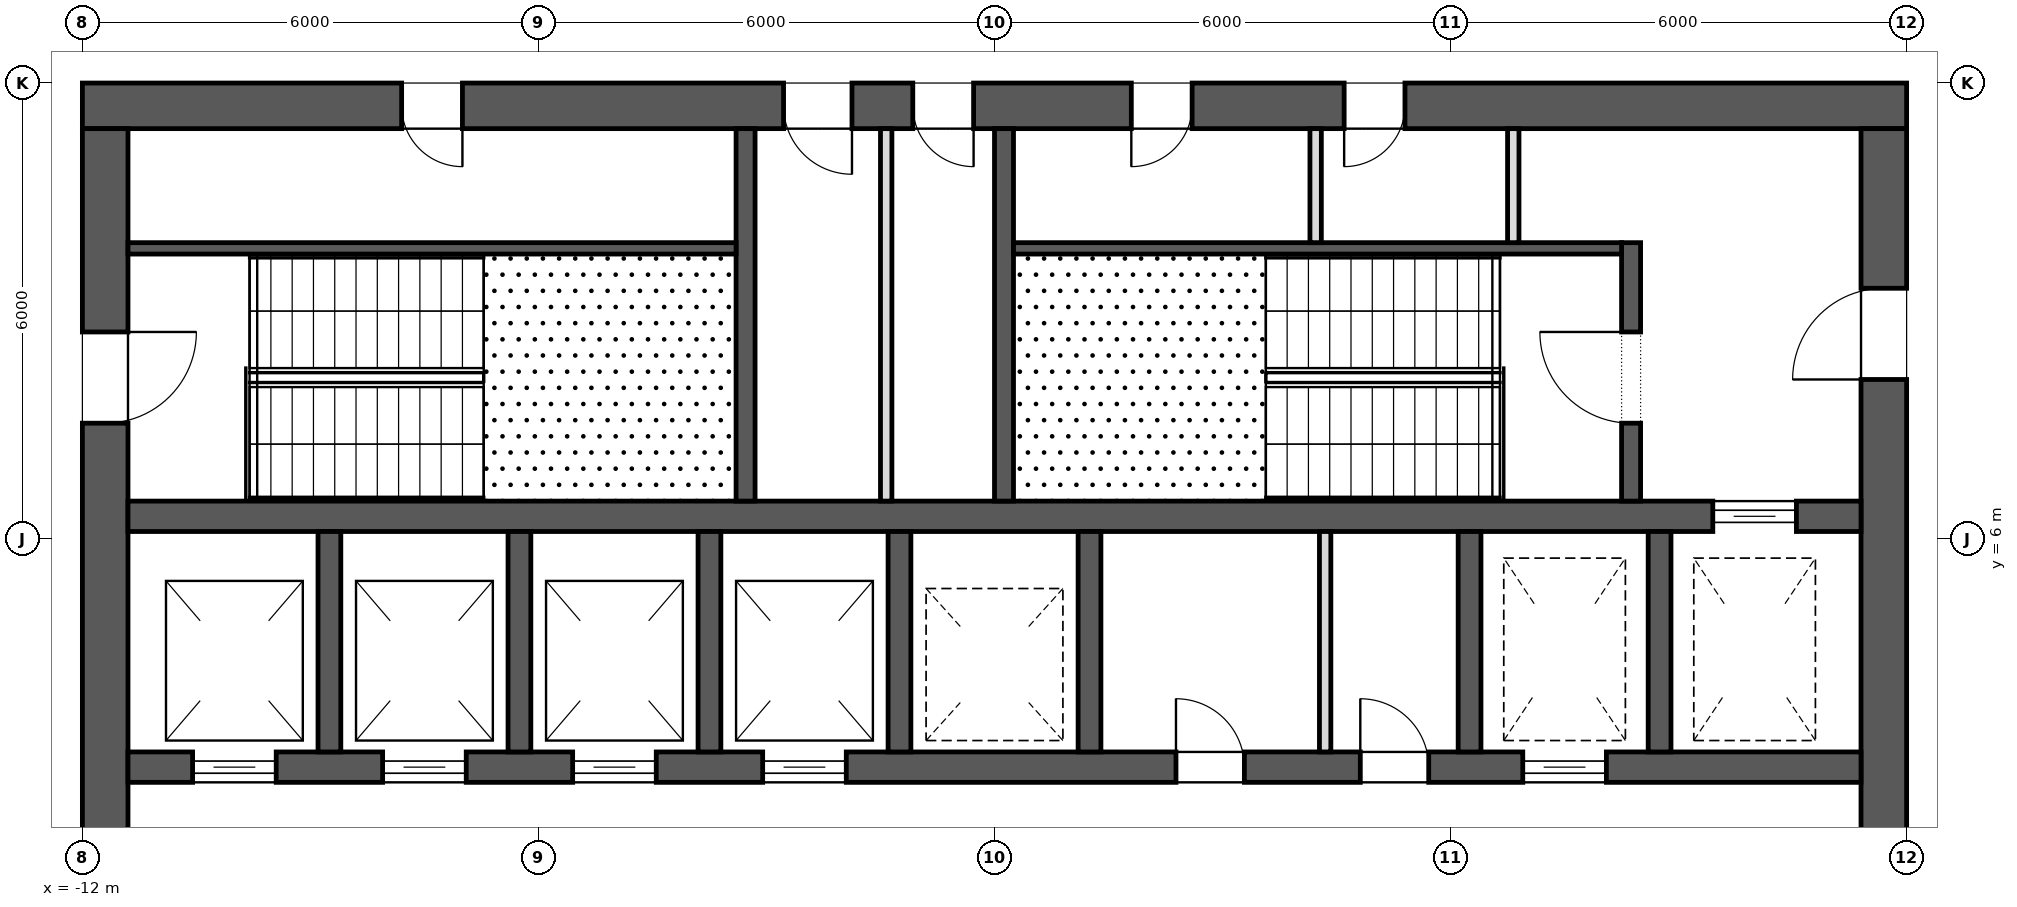
"""IFC4 building model, lengths in metres.
Left out: names, types, materials, properties, quantities, classifications, styles, units other than length and angle.
Written with IfcOpenShell. Run it as: python <this file> out.ifc"""

import sys

from ifc_helpers import new_model, si_unit, direction, frame, frame_2d, origin, place, context, subcontext, project, spatial, rectangle, extrude, element, fill, save


model = new_model("IFC4")
c1 = context("Model", 3, precision=1e-05, world=origin(), true_north=direction((0.0, 1.0)))
c2 = subcontext(c1, "Body", "Model", "MODEL_VIEW")
j1 = project(units=[si_unit("LENGTHUNIT", "METRE"), si_unit("PLANEANGLEUNIT", "RADIAN")], contexts=[c1])
p1 = place(None, origin())
s1 = spatial("IfcSite", under=j1, at=p1, CompositionType="ELEMENT")
p2 = place(p1, origin())
s2 = spatial("IfcBuilding", under=s1, at=p2, CompositionType="ELEMENT")
p3 = place(p2, frame((0.0, 0.0, 234.9)))
s3 = spatial("IfcBuildingStorey", under=s2, at=p3, CompositionType="ELEMENT", Elevation=234.9)
p4 = place(p3, frame((-12.0, 11.7, 0.0), z_axis=(0.0, 0.0, 1.0), x_axis=(1.0, 0.0, 0.0)))
e1 = element("IfcWall", 1, at=p4, inside=s3, PredefinedType="SHEAR", context=c2, shape_type="SweptSolid", body=[
    extrude(rectangle(XDim=24.0, YDim=0.6, at=frame_2d((12.0, 0.0))), origin(), (0.0, 0.0, 1.0), 4.0),
])
p5 = place(p4, frame((9.225, 0.0, 0.0)))
e2 = element("IfcOpeningElement", 2, at=p5, cuts=e1, PredefinedType="OPENING", context=c2, shape_type="SweptSolid", body=[
    extrude(rectangle(XDim=0.9, YDim=2.1, at=frame_2d((0.45, 1.05))), frame((0.0, 0.312, 0.0), z_axis=(0.0, -1.0, 0.0), x_axis=(1.0, 0.0, 0.0)), (0.0, 0.0, 1.0), 0.624),
])
p6 = place(p4, frame((10.925, 0.0, 0.0)))
e3 = element("IfcOpeningElement", 3, at=p6, cuts=e1, PredefinedType="OPENING", context=c2, shape_type="SweptSolid", body=[
    extrude(rectangle(XDim=0.8, YDim=2.1, at=frame_2d((0.4, 1.05))), frame((0.0, 0.312, 0.0), z_axis=(0.0, -1.0, 0.0), x_axis=(1.0, 0.0, 0.0)), (0.0, 0.0, 1.0), 0.624),
])
p7 = place(p4, frame((4.2, 0.0, 0.0)))
e4 = element("IfcOpeningElement", 4, at=p7, cuts=e1, PredefinedType="OPENING", context=c2, shape_type="SweptSolid", body=[
    extrude(rectangle(XDim=0.8, YDim=2.1, at=frame_2d((0.4, 1.05))), frame((0.0, 0.312, 0.0), z_axis=(0.0, -1.0, 0.0), x_axis=(1.0, 0.0, 0.0)), (0.0, 0.0, 1.0), 0.624),
])
p8 = place(p4, frame((13.8, 0.0, 0.0)))
e5 = element("IfcOpeningElement", 5, at=p8, cuts=e1, PredefinedType="OPENING", context=c2, shape_type="SweptSolid", body=[
    extrude(rectangle(XDim=0.8, YDim=2.1, at=frame_2d((0.4, 1.05))), frame((0.0, 0.312, 0.0), z_axis=(0.0, -1.0, 0.0), x_axis=(1.0, 0.0, 0.0)), (0.0, 0.0, 1.0), 0.624),
])
p9 = place(p4, frame((16.6, 0.0, 0.0)))
e6 = element("IfcOpeningElement", 6, at=p9, cuts=e1, PredefinedType="OPENING", context=c2, shape_type="SweptSolid", body=[
    extrude(rectangle(XDim=0.8, YDim=2.1, at=frame_2d((0.4, 1.05))), frame((0.0, 0.312, 0.0), z_axis=(0.0, -1.0, 0.0), x_axis=(1.0, 0.0, 0.0)), (0.0, 0.0, 1.0), 0.624),
])
p10 = place(p3, frame((11.7, -11.4, 0.0), z_axis=(0.0, 0.0, 1.0), x_axis=(0.0, 1.0, 0.0)))
e7 = element("IfcWall", 7, at=p10, inside=s3, PredefinedType="SHEAR", context=c2, shape_type="SweptSolid", body=[
    extrude(rectangle(XDim=22.8, YDim=0.6, at=frame_2d((11.4, 0.0))), origin(), (0.0, 0.0, 1.0), 4.0),
])
p11 = place(p10, frame((10.2, 0.0, 0.0)))
e8 = element("IfcOpeningElement", 8, at=p11, cuts=e7, PredefinedType="OPENING", context=c2, shape_type="SweptSolid", body=[
    extrude(rectangle(XDim=2.4, YDim=2.1, at=frame_2d((1.2, 1.05))), frame((0.0, 0.312, 0.0), z_axis=(0.0, -1.0, 0.0), x_axis=(1.0, 0.0, 0.0)), (0.0, 0.0, 1.0), 0.624),
])
p12 = place(p10, frame((19.5, 0.0, 0.0)))
e9 = element("IfcOpeningElement", 9, at=p12, cuts=e7, PredefinedType="OPENING", context=c2, shape_type="SweptSolid", body=[
    extrude(rectangle(XDim=1.2, YDim=2.1, at=frame_2d((0.6, 1.05))), frame((0.0, 0.312, 0.0), z_axis=(0.0, -1.0, 0.0), x_axis=(1.0, 0.0, 0.0)), (0.0, 0.0, 1.0), 0.624),
])
p13 = place(p10, frame((2.1, 0.0, 0.0)))
e10 = element("IfcOpeningElement", 10, at=p13, cuts=e7, PredefinedType="OPENING", context=c2, shape_type="SweptSolid", body=[
    extrude(rectangle(XDim=1.2, YDim=2.1, at=frame_2d((0.6, 1.05))), frame((0.0, 0.312, 0.0), z_axis=(0.0, -1.0, 0.0), x_axis=(1.0, 0.0, 0.0)), (0.0, 0.0, 1.0), 0.624),
])
p14 = place(p3, frame((-11.7, -11.4, 0.0), z_axis=(0.0, 0.0, 1.0), x_axis=(0.0, 1.0, 0.0)))
e11 = element("IfcWall", 11, at=p14, inside=s3, PredefinedType="SHEAR", context=c2, shape_type="SweptSolid", body=[
    extrude(rectangle(XDim=22.8, YDim=0.6, at=frame_2d((11.4, 0.0))), origin(), (0.0, 0.0, 1.0), 4.0),
])
p15 = place(p14, frame((10.2, 0.0, 0.0)))
e12 = element("IfcOpeningElement", 12, at=p15, cuts=e11, PredefinedType="OPENING", context=c2, shape_type="SweptSolid", body=[
    extrude(rectangle(XDim=2.4, YDim=2.1, at=frame_2d((1.2, 1.05))), frame((0.0, 0.312, 0.0), z_axis=(0.0, -1.0, 0.0), x_axis=(1.0, 0.0, 0.0)), (0.0, 0.0, 1.0), 0.624),
])
p16 = place(p14, frame((18.925, 0.0, 0.0)))
e13 = element("IfcOpeningElement", 13, at=p16, cuts=e11, PredefinedType="OPENING", context=c2, shape_type="SweptSolid", body=[
    extrude(rectangle(XDim=1.2, YDim=2.1, at=frame_2d((0.6, 1.05))), frame((0.0, 0.312, 0.0), z_axis=(0.0, -1.0, 0.0), x_axis=(1.0, 0.0, 0.0)), (0.0, 0.0, 1.0), 0.624),
])
p17 = place(p14, frame((2.675, 0.0, 0.0)))
e14 = element("IfcOpeningElement", 14, at=p17, cuts=e11, PredefinedType="OPENING", context=c2, shape_type="SweptSolid", body=[
    extrude(rectangle(XDim=1.2, YDim=2.1, at=frame_2d((0.6, 1.05))), frame((0.0, 0.312, 0.0), z_axis=(0.0, -1.0, 0.0), x_axis=(1.0, 0.0, 0.0)), (0.0, 0.0, 1.0), 0.624),
])
p18 = place(p3, frame((-11.4, 3.0, 0.0), z_axis=(0.0, 0.0, 1.0), x_axis=(1.0, 0.0, 0.0)))
e15 = element("IfcWall", 15, at=p18, inside=s3, PredefinedType="SHEAR", context=c2, shape_type="SweptSolid", body=[
    extrude(rectangle(XDim=22.8, YDim=0.4, at=frame_2d((11.4, 0.0))), origin(), (0.0, 0.0, 1.0), 4.0),
])
p19 = place(p18, frame((0.85, 0.0, 0.0)))
e16 = element("IfcOpeningElement", 16, at=p19, cuts=e15, PredefinedType="OPENING", context=c2, shape_type="SweptSolid", body=[
    extrude(rectangle(XDim=1.1, YDim=2.1, at=frame_2d((0.55, 1.05))), frame((0.0, 0.212, 0.0), z_axis=(0.0, -1.0, 0.0), x_axis=(1.0, 0.0, 0.0)), (0.0, 0.0, 1.0), 0.424),
])
p20 = place(p18, frame((3.35, 0.0, 0.0)))
e17 = element("IfcOpeningElement", 17, at=p20, cuts=e15, PredefinedType="OPENING", context=c2, shape_type="SweptSolid", body=[
    extrude(rectangle(XDim=1.1, YDim=2.1, at=frame_2d((0.55, 1.05))), frame((0.0, 0.212, 0.0), z_axis=(0.0, -1.0, 0.0), x_axis=(1.0, 0.0, 0.0)), (0.0, 0.0, 1.0), 0.424),
])
p21 = place(p18, frame((5.85, 0.0, 0.0)))
e18 = element("IfcOpeningElement", 18, at=p21, cuts=e15, PredefinedType="OPENING", context=c2, shape_type="SweptSolid", body=[
    extrude(rectangle(XDim=1.1, YDim=2.1, at=frame_2d((0.55, 1.05))), frame((0.0, 0.212, 0.0), z_axis=(0.0, -1.0, 0.0), x_axis=(1.0, 0.0, 0.0)), (0.0, 0.0, 1.0), 0.424),
])
p22 = place(p18, frame((8.35, 0.0, 0.0)))
e19 = element("IfcOpeningElement", 19, at=p22, cuts=e15, PredefinedType="OPENING", context=c2, shape_type="SweptSolid", body=[
    extrude(rectangle(XDim=1.1, YDim=2.1, at=frame_2d((0.55, 1.05))), frame((0.0, 0.212, 0.0), z_axis=(0.0, -1.0, 0.0), x_axis=(1.0, 0.0, 0.0)), (0.0, 0.0, 1.0), 0.424),
])
p23 = place(p18, frame((18.35, 0.0, 0.0)))
e20 = element("IfcOpeningElement", 20, at=p23, cuts=e15, PredefinedType="OPENING", context=c2, shape_type="SweptSolid", body=[
    extrude(rectangle(XDim=1.1, YDim=2.1, at=frame_2d((0.55, 1.05))), frame((0.0, 0.212, 0.0), z_axis=(0.0, -1.0, 0.0), x_axis=(1.0, 0.0, 0.0)), (0.0, 0.0, 1.0), 0.424),
])
p24 = place(p18, frame((13.788, 0.0, 0.0)))
e21 = element("IfcOpeningElement", 21, at=p24, cuts=e15, PredefinedType="OPENING", context=c2, shape_type="SweptSolid", body=[
    extrude(rectangle(XDim=0.9, YDim=2.1, at=frame_2d((0.45, 1.05))), frame((0.0, 0.212, 0.0), z_axis=(0.0, -1.0, 0.0), x_axis=(1.0, 0.0, 0.0)), (0.0, 0.0, 1.0), 0.424),
])
p25 = place(p18, frame((16.212, 0.0, 0.0)))
e22 = element("IfcOpeningElement", 22, at=p25, cuts=e15, PredefinedType="OPENING", context=c2, shape_type="SweptSolid", body=[
    extrude(rectangle(XDim=0.9, YDim=2.1, at=frame_2d((0.45, 1.05))), frame((0.0, 0.212, 0.0), z_axis=(0.0, -1.0, 0.0), x_axis=(1.0, 0.0, 0.0)), (0.0, 0.0, 1.0), 0.424),
])
p26 = place(p3, frame((-11.4, 6.3, 0.0), z_axis=(0.0, 0.0, 1.0), x_axis=(1.0, 0.0, 0.0)))
e23 = element("IfcWall", 23, at=p26, inside=s3, PredefinedType="SHEAR", context=c2, shape_type="SweptSolid", body=[
    extrude(rectangle(XDim=22.8, YDim=0.4, at=frame_2d((11.4, 0.0))), origin(), (0.0, 0.0, 1.0), 4.0),
])
p27 = place(p26, frame((20.85, 0.0, 0.0)))
e24 = element("IfcOpeningElement", 24, at=p27, cuts=e23, PredefinedType="OPENING", context=c2, shape_type="SweptSolid", body=[
    extrude(rectangle(XDim=1.1, YDim=2.1, at=frame_2d((0.55, 1.05))), frame((0.0, 0.212, 0.0), z_axis=(0.0, -1.0, 0.0), x_axis=(1.0, 0.0, 0.0)), (0.0, 0.0, 1.0), 0.424),
])
for number, where, z_axis, x_axis in (
    (25, (-8.75, 3.2, 0.0), (0.0, 0.0, 1.0), (0.0, 1.0, 0.0)),
    (26, (-6.25, 3.2, 0.0), (0.0, 0.0, 1.0), (0.0, 1.0, 0.0)),
    (27, (-3.75, 3.2, 0.0), (0.0, 0.0, 1.0), (0.0, 1.0, 0.0)),
    (28, (-1.25, 3.2, 0.0), (0.0, 0.0, 1.0), (0.0, 1.0, 0.0)),
    (29, (1.25, 3.2, 0.0), (0.0, 0.0, 1.0), (0.0, 1.0, 0.0)),
    (30, (6.25, 3.2, 0.0), (0.0, 0.0, 1.0), (0.0, 1.0, 0.0)),
    (31, (8.75, 3.2, 0.0), (0.0, 0.0, 1.0), (0.0, 1.0, 0.0)),
):
    element("IfcWall", number, at=place(p3, frame(where, z_axis=z_axis, x_axis=x_axis)), inside=s3, PredefinedType="SHEAR", context=c2, shape_type="SweptSolid", body=[
        extrude(rectangle(XDim=2.9, YDim=0.3, at=frame_2d((1.45, 0.0))), origin(), (0.0, 0.0, 1.0), 4.0),
    ])
for number, where, z_axis, x_axis in (
    (32, (-3.275, 6.5, 0.0), (0.0, 0.0, 1.0), (0.0, 1.0, 0.0)),
    (33, (0.125, 6.5, 0.0), (0.0, 0.0, 1.0), (0.0, 1.0, 0.0)),
):
    element("IfcWall", number, at=place(p3, frame(where, z_axis=z_axis, x_axis=x_axis)), inside=s3, PredefinedType="SHEAR", context=c2, shape_type="SweptSolid", body=[
        extrude(rectangle(XDim=4.9, YDim=0.25, at=frame_2d((2.45, 0.0))), origin(), (0.0, 0.0, 1.0), 3.7),
    ])
p28 = place(p3, frame((8.375, 6.5, 0.0), z_axis=(0.0, 0.0, 1.0), x_axis=(0.0, 1.0, 0.0)))
e34 = element("IfcWall", 34, at=p28, inside=s3, PredefinedType="SHEAR", context=c2, shape_type="SweptSolid", body=[
    extrude(rectangle(XDim=3.4, YDim=0.25, at=frame_2d((1.7, 0.0))), origin(), (0.0, 0.0, 1.0), 3.7),
])
p29 = place(p28, frame((1.025, 0.0, 0.0)))
e35 = element("IfcOpeningElement", 35, at=p29, cuts=e34, PredefinedType="OPENING", context=c2, shape_type="SweptSolid", body=[
    extrude(rectangle(XDim=1.2, YDim=2.1, at=frame_2d((0.6, 1.05))), frame((0.0, 0.137, 0.0), z_axis=(0.0, -1.0, 0.0), x_axis=(1.0, 0.0, 0.0)), (0.0, 0.0, 1.0), 0.274),
])
for number, where, z_axis, x_axis in (
    (36, (-11.4, 9.825, 0.0), (0.0, 0.0, 1.0), (1.0, 0.0, 0.0)),
    (37, (0.25, 9.825, 0.0), (0.0, 0.0, 1.0), (1.0, 0.0, 0.0)),
):
    element("IfcWall", number, at=place(p3, frame(where, z_axis=z_axis, x_axis=x_axis)), inside=s3, PredefinedType="SHEAR", context=c2, shape_type="SweptSolid", body=[
        extrude(rectangle(XDim=8.0, YDim=0.15, at=frame_2d((4.0, 0.0))), origin(), (0.0, 0.0, 1.0), 3.7),
    ])
p30 = place(p3, frame((-1.425, 6.5, 0.0), z_axis=(0.0, 0.0, 1.0), x_axis=(0.0, 1.0, 0.0)))
e38 = element("IfcWall", 38, at=p30, inside=s3, PredefinedType="PARTITIONING", context=c2, shape_type="SweptSolid", body=[
    extrude(rectangle(XDim=4.9, YDim=0.15, at=frame_2d((2.45, 0.0))), origin(), (0.0, 0.0, 1.0), 3.7),
])
for number, where, z_axis, x_axis in (
    (39, (4.225, 9.9, 0.0), (0.0, 0.0, 1.0), (0.0, 1.0, 0.0)),
    (40, (6.825, 9.9, 0.0), (0.0, 0.0, 1.0), (0.0, 1.0, 0.0)),
):
    element("IfcWall", number, at=place(p3, frame(where, z_axis=z_axis, x_axis=x_axis)), inside=s3, PredefinedType="PARTITIONING", context=c2, shape_type="SweptSolid", body=[
        extrude(rectangle(XDim=1.5, YDim=0.15, at=frame_2d((0.75, 0.0))), origin(), (0.0, 0.0, 1.0), 3.7),
    ])
p31 = place(p3, frame((4.35, 3.2, 0.0), z_axis=(0.0, 0.0, 1.0), x_axis=(0.0, 1.0, 0.0)))
e41 = element("IfcWall", 41, at=p31, inside=s3, PredefinedType="PARTITIONING", context=c2, shape_type="SweptSolid", body=[
    extrude(rectangle(XDim=2.9, YDim=0.15, at=frame_2d((1.45, 0.0))), origin(), (0.0, 0.0, 1.0), 3.7),
])
p32 = place(p27, origin())
e42 = element("IfcDoor", 42, at=p32, inside=s3, OperationType="SLIDING_TO_LEFT", PredefinedType="DOOR", context=c2, shape_type="SweptSolid", body=[
    extrude(rectangle(XDim=1.1, YDim=2.1, at=frame_2d((0.55, 1.05))), frame((0.0, 0.025, 0.0), z_axis=(0.0, -1.0, 0.0), x_axis=(1.0, 0.0, 0.0)), (0.0, 0.0, 1.0), 0.05),
])
fill(e24, e42)
p33 = place(p19, origin())
e43 = element("IfcDoor", 43, at=p33, inside=s3, OperationType="SLIDING_TO_LEFT", PredefinedType="DOOR", context=c2, shape_type="SweptSolid", body=[
    extrude(rectangle(XDim=1.1, YDim=2.1, at=frame_2d((0.55, 1.05))), frame((0.0, 0.025, 0.0), z_axis=(0.0, -1.0, 0.0), x_axis=(1.0, 0.0, 0.0)), (0.0, 0.0, 1.0), 0.05),
])
fill(e16, e43)
p34 = place(p20, origin())
e44 = element("IfcDoor", 44, at=p34, inside=s3, OperationType="SLIDING_TO_LEFT", PredefinedType="DOOR", context=c2, shape_type="SweptSolid", body=[
    extrude(rectangle(XDim=1.1, YDim=2.1, at=frame_2d((0.55, 1.05))), frame((0.0, 0.025, 0.0), z_axis=(0.0, -1.0, 0.0), x_axis=(1.0, 0.0, 0.0)), (0.0, 0.0, 1.0), 0.05),
])
fill(e17, e44)
p35 = place(p21, origin())
e45 = element("IfcDoor", 45, at=p35, inside=s3, OperationType="SLIDING_TO_LEFT", PredefinedType="DOOR", context=c2, shape_type="SweptSolid", body=[
    extrude(rectangle(XDim=1.1, YDim=2.1, at=frame_2d((0.55, 1.05))), frame((0.0, 0.025, 0.0), z_axis=(0.0, -1.0, 0.0), x_axis=(1.0, 0.0, 0.0)), (0.0, 0.0, 1.0), 0.05),
])
fill(e18, e45)
p36 = place(p22, origin())
e46 = element("IfcDoor", 46, at=p36, inside=s3, OperationType="SLIDING_TO_LEFT", PredefinedType="DOOR", context=c2, shape_type="SweptSolid", body=[
    extrude(rectangle(XDim=1.1, YDim=2.1, at=frame_2d((0.55, 1.05))), frame((0.0, 0.025, 0.0), z_axis=(0.0, -1.0, 0.0), x_axis=(1.0, 0.0, 0.0)), (0.0, 0.0, 1.0), 0.05),
])
fill(e19, e46)
p37 = place(p23, origin())
e47 = element("IfcDoor", 47, at=p37, inside=s3, OperationType="SLIDING_TO_LEFT", PredefinedType="DOOR", context=c2, shape_type="SweptSolid", body=[
    extrude(rectangle(XDim=1.1, YDim=2.1, at=frame_2d((0.55, 1.05))), frame((0.0, 0.025, 0.0), z_axis=(0.0, -1.0, 0.0), x_axis=(1.0, 0.0, 0.0)), (0.0, 0.0, 1.0), 0.05),
])
fill(e20, e47)
p38 = place(p16, frame((1.2, 0.0, 0.0), z_axis=(0.0, 0.0, 1.0), x_axis=(-1.0, 0.0, 0.0)))
e48 = element("IfcDoor", 48, at=p38, inside=s3, OperationType="SINGLE_SWING_RIGHT", PredefinedType="DOOR", context=c2, shape_type="SweptSolid", body=[
    extrude(rectangle(XDim=1.2, YDim=2.1, at=frame_2d((0.6, 1.05))), frame((0.0, 0.025, 0.0), z_axis=(0.0, -1.0, 0.0), x_axis=(1.0, 0.0, 0.0)), (0.0, 0.0, 1.0), 0.05),
])
fill(e13, e48)
p39 = place(p29, origin())
e49 = element("IfcDoor", 49, at=p39, inside=s3, OperationType="SINGLE_SWING_LEFT", PredefinedType="DOOR", context=c2, shape_type="SweptSolid", body=[
    extrude(rectangle(XDim=1.2, YDim=2.1, at=frame_2d((0.6, 1.05))), frame((0.0, 0.025, 0.0), z_axis=(0.0, -1.0, 0.0), x_axis=(1.0, 0.0, 0.0)), (0.0, 0.0, 1.0), 0.05),
])
fill(e35, e49)
p40 = place(p12, origin())
e50 = element("IfcDoor", 50, at=p40, inside=s3, OperationType="SINGLE_SWING_RIGHT", PredefinedType="DOOR", context=c2, shape_type="SweptSolid", body=[
    extrude(rectangle(XDim=1.2, YDim=2.1, at=frame_2d((0.6, 1.05))), frame((0.0, 0.025, 0.0), z_axis=(0.0, -1.0, 0.0), x_axis=(1.0, 0.0, 0.0)), (0.0, 0.0, 1.0), 0.05),
])
fill(e9, e50)
p41 = place(p5, frame((0.9, 0.0, 0.0), z_axis=(0.0, 0.0, 1.0), x_axis=(-1.0, 0.0, 0.0)))
e51 = element("IfcDoor", 51, at=p41, inside=s3, OperationType="SINGLE_SWING_RIGHT", PredefinedType="DOOR", context=c2, shape_type="SweptSolid", body=[
    extrude(rectangle(XDim=0.9, YDim=2.1, at=frame_2d((0.45, 1.05))), frame((0.0, 0.025, 0.0), z_axis=(0.0, -1.0, 0.0), x_axis=(1.0, 0.0, 0.0)), (0.0, 0.0, 1.0), 0.05),
])
fill(e2, e51)
p42 = place(p6, frame((0.8, 0.0, 0.0), z_axis=(0.0, 0.0, 1.0), x_axis=(-1.0, 0.0, 0.0)))
e52 = element("IfcDoor", 52, at=p42, inside=s3, OperationType="SINGLE_SWING_RIGHT", PredefinedType="DOOR", context=c2, shape_type="SweptSolid", body=[
    extrude(rectangle(XDim=0.8, YDim=2.1, at=frame_2d((0.4, 1.05))), frame((0.0, 0.025, 0.0), z_axis=(0.0, -1.0, 0.0), x_axis=(1.0, 0.0, 0.0)), (0.0, 0.0, 1.0), 0.05),
])
fill(e3, e52)
p43 = place(p7, frame((0.8, 0.0, 0.0), z_axis=(0.0, 0.0, 1.0), x_axis=(-1.0, 0.0, 0.0)))
e53 = element("IfcDoor", 53, at=p43, inside=s3, OperationType="SINGLE_SWING_RIGHT", PredefinedType="DOOR", context=c2, shape_type="SweptSolid", body=[
    extrude(rectangle(XDim=0.8, YDim=2.1, at=frame_2d((0.4, 1.05))), frame((0.0, 0.025, 0.0), z_axis=(0.0, -1.0, 0.0), x_axis=(1.0, 0.0, 0.0)), (0.0, 0.0, 1.0), 0.05),
])
fill(e4, e53)
p44 = place(p8, frame((0.8, 0.0, 0.0), z_axis=(0.0, 0.0, 1.0), x_axis=(-1.0, 0.0, 0.0)))
e54 = element("IfcDoor", 54, at=p44, inside=s3, OperationType="SINGLE_SWING_LEFT", PredefinedType="DOOR", context=c2, shape_type="SweptSolid", body=[
    extrude(rectangle(XDim=0.8, YDim=2.1, at=frame_2d((0.4, 1.05))), frame((0.0, 0.025, 0.0), z_axis=(0.0, -1.0, 0.0), x_axis=(1.0, 0.0, 0.0)), (0.0, 0.0, 1.0), 0.05),
])
fill(e5, e54)
p45 = place(p9, frame((0.8, 0.0, 0.0), z_axis=(0.0, 0.0, 1.0), x_axis=(-1.0, 0.0, 0.0)))
e55 = element("IfcDoor", 55, at=p45, inside=s3, OperationType="SINGLE_SWING_LEFT", PredefinedType="DOOR", context=c2, shape_type="SweptSolid", body=[
    extrude(rectangle(XDim=0.8, YDim=2.1, at=frame_2d((0.4, 1.05))), frame((0.0, 0.025, 0.0), z_axis=(0.0, -1.0, 0.0), x_axis=(1.0, 0.0, 0.0)), (0.0, 0.0, 1.0), 0.05),
])
fill(e6, e55)
p46 = place(p24, origin())
e56 = element("IfcDoor", 56, at=p46, inside=s3, OperationType="SINGLE_SWING_RIGHT", PredefinedType="DOOR", context=c2, shape_type="SweptSolid", body=[
    extrude(rectangle(XDim=0.9, YDim=2.1, at=frame_2d((0.45, 1.05))), frame((0.0, 0.025, 0.0), z_axis=(0.0, -1.0, 0.0), x_axis=(1.0, 0.0, 0.0)), (0.0, 0.0, 1.0), 0.05),
])
fill(e21, e56)
p47 = place(p25, origin())
e57 = element("IfcDoor", 57, at=p47, inside=s3, OperationType="SINGLE_SWING_RIGHT", PredefinedType="DOOR", context=c2, shape_type="SweptSolid", body=[
    extrude(rectangle(XDim=0.9, YDim=2.1, at=frame_2d((0.45, 1.05))), frame((0.0, 0.025, 0.0), z_axis=(0.0, -1.0, 0.0), x_axis=(1.0, 0.0, 0.0)), (0.0, 0.0, 1.0), 0.05),
])
fill(e22, e57)
save(model, sys.argv[1])
